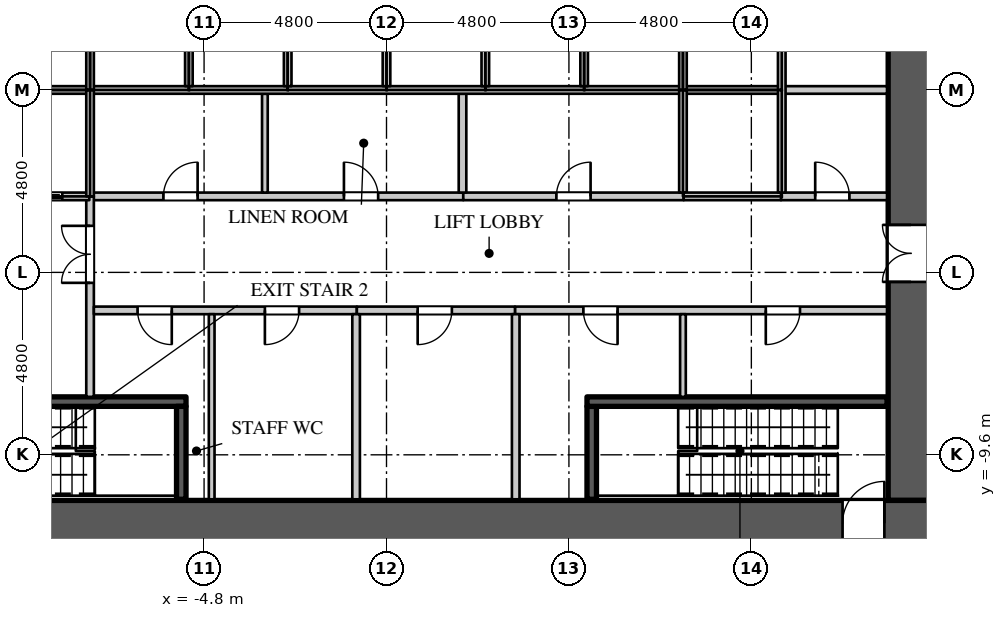
"""IFC4 building model, lengths in metres.
Left out: names, types, materials, properties, quantities, classifications, styles, units other than length and angle.
Written with IfcOpenShell. Run it as: python <this file> out.ifc"""

import sys

from ifc_helpers import new_model, si_unit, direction, frame, frame_2d, origin, place, context, subcontext, project, spatial, rectangle, extrude, element, fill, save


model = new_model("IFC4")
c1 = context("Model", 3, precision=1e-05, world=origin(), true_north=direction((0.0, 1.0)))
c2 = subcontext(c1, "Body", "Model", "MODEL_VIEW")
j1 = project(units=[si_unit("LENGTHUNIT", "METRE"), si_unit("PLANEANGLEUNIT", "RADIAN")], contexts=[c1])
p1 = place(None, origin())
s1 = spatial("IfcSite", under=j1, at=p1, CompositionType="ELEMENT")
p2 = place(p1, origin())
s2 = spatial("IfcBuilding", under=s1, at=p2, CompositionType="ELEMENT")
p3 = place(p2, frame((0.0, 0.0, 16.0)))
s3 = spatial("IfcBuildingStorey", under=s2, at=p3, CompositionType="ELEMENT", Elevation=16.0)
p4 = place(p3, frame((-14.4, -11.4, 0.0), z_axis=(0.0, 0.0, 1.0), x_axis=(1.0, 0.0, 0.0)))
e1 = element("IfcWall", 1, at=p4, inside=s3, PredefinedType="SHEAR", context=c2, shape_type="SweptSolid", body=[
    extrude(rectangle(XDim=28.8, YDim=1.2, at=frame_2d((14.4, 0.0))), origin(), (0.0, 0.0, 1.0), 5.0),
])
p5 = place(p4, frame((1.3, 0.0, 0.0)))
e2 = element("IfcOpeningElement", 2, at=p5, cuts=e1, PredefinedType="OPENING", context=c2, shape_type="SweptSolid", body=[
    extrude(rectangle(XDim=1.1, YDim=2.2, at=frame_2d((0.55, 1.1))), frame((0.0, 0.61, 0.0), z_axis=(0.0, -1.0, 0.0), x_axis=(1.0, 0.0, 0.0)), (0.0, 0.0, 1.0), 1.22),
])
p6 = place(p4, frame((26.4, 0.0, 0.0)))
e3 = element("IfcOpeningElement", 3, at=p6, cuts=e1, PredefinedType="OPENING", context=c2, shape_type="SweptSolid", body=[
    extrude(rectangle(XDim=1.1, YDim=2.2, at=frame_2d((0.55, 1.1))), frame((0.0, 0.61, 0.0), z_axis=(0.0, -1.0, 0.0), x_axis=(1.0, 0.0, 0.0)), (0.0, 0.0, 1.0), 1.22),
])
p7 = place(p3, frame((13.8, -10.8, 0.0), z_axis=(0.0, 0.0, 1.0), x_axis=(0.0, 1.0, 0.0)))
e4 = element("IfcWall", 4, at=p7, inside=s3, PredefinedType="SHEAR", context=c2, shape_type="SweptSolid", body=[
    extrude(rectangle(XDim=21.6, YDim=1.2, at=frame_2d((10.8, 0.0))), origin(), (0.0, 0.0, 1.0), 5.0),
])
p8 = place(p7, frame((14.35, 0.0, 0.0)))
e5 = element("IfcOpeningElement", 5, at=p8, cuts=e4, PredefinedType="OPENING", context=c2, shape_type="SweptSolid", body=[
    extrude(rectangle(XDim=1.5, YDim=2.4, at=frame_2d((0.75, 1.2))), frame((0.0, 0.61, 0.0), z_axis=(0.0, -1.0, 0.0), x_axis=(1.0, 0.0, 0.0)), (0.0, 0.0, 1.0), 1.22),
])
p9 = place(p7, frame((5.75, 0.0, 0.0)))
e6 = element("IfcOpeningElement", 6, at=p9, cuts=e4, PredefinedType="OPENING", context=c2, shape_type="SweptSolid", body=[
    extrude(rectangle(XDim=1.5, YDim=2.4, at=frame_2d((0.75, 1.2))), frame((0.0, 0.61, 0.0), z_axis=(0.0, -1.0, 0.0), x_axis=(1.0, 0.0, 0.0)), (0.0, 0.0, 1.0), 1.22),
])
p10 = place(p3, frame((-7.82, -2.8, 0.0), z_axis=(0.0, 0.0, 1.0), x_axis=(1.0, 0.0, 0.0)))
e7 = element("IfcWall", 7, at=p10, inside=s3, PredefinedType="PARTITIONING", context=c2, shape_type="SweptSolid", body=[
    extrude(rectangle(XDim=9.84, YDim=0.2, at=frame_2d((4.92, 0.0))), origin(), (0.0, 0.0, 1.0), 4.4),
])
p11 = place(p10, frame((1.95, 0.0, 0.0)))
e8 = element("IfcOpeningElement", 8, at=p11, cuts=e7, PredefinedType="OPENING", context=c2, shape_type="SweptSolid", body=[
    extrude(rectangle(XDim=0.9, YDim=2.2, at=frame_2d((0.45, 1.1))), frame((0.0, 0.11, 0.0), z_axis=(0.0, -1.0, 0.0), x_axis=(1.0, 0.0, 0.0)), (0.0, 0.0, 1.0), 0.22),
])
p12 = place(p10, frame((6.7, 0.0, 0.0)))
e9 = element("IfcOpeningElement", 9, at=p12, cuts=e7, PredefinedType="OPENING", context=c2, shape_type="SweptSolid", body=[
    extrude(rectangle(XDim=0.9, YDim=2.2, at=frame_2d((0.45, 1.1))), frame((0.0, 0.11, 0.0), z_axis=(0.0, -1.0, 0.0), x_axis=(1.0, 0.0, 0.0)), (0.0, 0.0, 1.0), 0.22),
])
p13 = place(p3, frame((-7.8, -8.075, 0.0), z_axis=(0.0, 0.0, 1.0), x_axis=(0.0, 1.0, 0.0)))
e10 = element("IfcWall", 10, at=p13, inside=s3, PredefinedType="PARTITIONING", context=c2, shape_type="SweptSolid", body=[
    extrude(rectangle(XDim=5.275, YDim=0.2, at=frame_2d((2.637, 0.0))), origin(), (0.0, 0.0, 1.0), 4.4),
])
p14 = place(p13, frame((3.0, 0.0, 0.0)))
e11 = element("IfcOpeningElement", 11, at=p14, cuts=e10, PredefinedType="OPENING", context=c2, shape_type="SweptSolid", body=[
    extrude(rectangle(XDim=1.5, YDim=2.4, at=frame_2d((0.75, 1.2))), frame((0.0, 0.11, 0.0), z_axis=(0.0, -1.0, 0.0), x_axis=(1.0, 0.0, 0.0)), (0.0, 0.0, 1.0), 0.22),
])
p15 = place(p3, frame((-7.7, -5.8, 0.0), z_axis=(0.0, 0.0, 1.0), x_axis=(1.0, 0.0, 0.0)))
e12 = element("IfcWall", 12, at=p15, inside=s3, PredefinedType="PARTITIONING", context=c2, shape_type="SweptSolid", body=[
    extrude(rectangle(XDim=6.92, YDim=0.2, at=frame_2d((3.46, 0.0))), origin(), (0.0, 0.0, 1.0), 4.4),
])
p16 = place(p15, frame((1.15, 0.0, 0.0)))
e13 = element("IfcOpeningElement", 13, at=p16, cuts=e12, PredefinedType="OPENING", context=c2, shape_type="SweptSolid", body=[
    extrude(rectangle(XDim=0.9, YDim=2.2, at=frame_2d((0.45, 1.1))), frame((0.0, 0.11, 0.0), z_axis=(0.0, -1.0, 0.0), x_axis=(1.0, 0.0, 0.0)), (0.0, 0.0, 1.0), 0.22),
])
p17 = place(p15, frame((4.5, 0.0, 0.0)))
e14 = element("IfcOpeningElement", 14, at=p17, cuts=e12, PredefinedType="OPENING", context=c2, shape_type="SweptSolid", body=[
    extrude(rectangle(XDim=0.9, YDim=2.2, at=frame_2d((0.45, 1.1))), frame((0.0, 0.11, 0.0), z_axis=(0.0, -1.0, 0.0), x_axis=(1.0, 0.0, 0.0)), (0.0, 0.0, 1.0), 0.22),
])
p18 = place(p3, frame((3.38, -5.8, 0.0), z_axis=(0.0, 0.0, 1.0), x_axis=(1.0, 0.0, 0.0)))
e15 = element("IfcWall", 15, at=p18, inside=s3, PredefinedType="PARTITIONING", context=c2, shape_type="SweptSolid", body=[
    extrude(rectangle(XDim=9.79, YDim=0.2, at=frame_2d((4.895, 0.0))), origin(), (0.0, 0.0, 1.0), 4.4),
])
p19 = place(p18, frame((1.8, 0.0, 0.0)))
e16 = element("IfcOpeningElement", 16, at=p19, cuts=e15, PredefinedType="OPENING", context=c2, shape_type="SweptSolid", body=[
    extrude(rectangle(XDim=0.9, YDim=2.2, at=frame_2d((0.45, 1.1))), frame((0.0, 0.11, 0.0), z_axis=(0.0, -1.0, 0.0), x_axis=(1.0, 0.0, 0.0)), (0.0, 0.0, 1.0), 0.22),
])
p20 = place(p18, frame((6.6, 0.0, 0.0)))
e17 = element("IfcOpeningElement", 17, at=p20, cuts=e15, PredefinedType="OPENING", context=c2, shape_type="SweptSolid", body=[
    extrude(rectangle(XDim=0.9, YDim=2.2, at=frame_2d((0.45, 1.1))), frame((0.0, 0.11, 0.0), z_axis=(0.0, -1.0, 0.0), x_axis=(1.0, 0.0, 0.0)), (0.0, 0.0, 1.0), 0.22),
])
p21 = place(p3, frame((-4.6, -10.77, 0.0), z_axis=(0.0, 0.0, 1.0), x_axis=(0.0, 1.0, 0.0)))
e18 = element("IfcWall", 18, at=p21, inside=s3, PredefinedType="PARTITIONING", context=c2, shape_type="SweptSolid", body=[
    extrude(rectangle(XDim=4.87, YDim=0.15, at=frame_2d((2.435, 0.0))), origin(), (0.0, 0.0, 1.0), 4.4),
])
p22 = place(p3, frame((-3.2, -2.7, 0.0), z_axis=(0.0, 0.0, 1.0), x_axis=(0.0, 1.0, 0.0)))
e19 = element("IfcWall", 19, at=p22, inside=s3, PredefinedType="PARTITIONING", context=c2, shape_type="SweptSolid", body=[
    extrude(rectangle(XDim=2.6, YDim=0.15, at=frame_2d((1.3, 0.0))), origin(), (0.0, 0.0, 1.0), 4.4),
])
p23 = place(p3, frame((7.8, -8.075, 0.0), z_axis=(0.0, 0.0, 1.0), x_axis=(0.0, 1.0, 0.0)))
e20 = element("IfcWall", 20, at=p23, inside=s3, PredefinedType="PARTITIONING", context=c2, shape_type="SweptSolid", body=[
    extrude(rectangle(XDim=2.175, YDim=0.15, at=frame_2d((1.087, 0.0))), origin(), (0.0, 0.0, 1.0), 4.4),
])
p24 = place(p3, frame((-0.78, -5.8, 0.0), z_axis=(0.0, 0.0, 1.0), x_axis=(1.0, 0.0, 0.0)))
e21 = element("IfcWall", 21, at=p24, inside=s3, PredefinedType="PARTITIONING", context=c2, shape_type="SweptSolid", body=[
    extrude(rectangle(XDim=4.16, YDim=0.2, at=frame_2d((2.08, 0.0))), origin(), (0.0, 0.0, 1.0), 4.4),
])
p25 = place(p24, frame((1.6, 0.0, 0.0)))
e22 = element("IfcOpeningElement", 22, at=p25, cuts=e21, PredefinedType="OPENING", context=c2, shape_type="SweptSolid", body=[
    extrude(rectangle(XDim=0.9, YDim=2.2, at=frame_2d((0.45, 1.1))), frame((0.0, 0.11, 0.0), z_axis=(0.0, -1.0, 0.0), x_axis=(1.0, 0.0, 0.0)), (0.0, 0.0, 1.0), 0.22),
])
p26 = place(p3, frame((-0.8, -10.77, 0.0), z_axis=(0.0, 0.0, 1.0), x_axis=(0.0, 1.0, 0.0)))
e23 = element("IfcWall", 23, at=p26, inside=s3, PredefinedType="PARTITIONING", context=c2, shape_type="SweptSolid", body=[
    extrude(rectangle(XDim=4.87, YDim=0.2, at=frame_2d((2.435, 0.0))), origin(), (0.0, 0.0, 1.0), 4.4),
])
p27 = place(p3, frame((2.02, -2.8, 0.0), z_axis=(0.0, 0.0, 1.0), x_axis=(1.0, 0.0, 0.0)))
e24 = element("IfcWall", 24, at=p27, inside=s3, PredefinedType="PARTITIONING", context=c2, shape_type="SweptSolid", body=[
    extrude(rectangle(XDim=5.8, YDim=0.2, at=frame_2d((2.9, 0.0))), origin(), (0.0, 0.0, 1.0), 4.4),
])
p28 = place(p27, frame((2.45, 0.0, 0.0)))
e25 = element("IfcOpeningElement", 25, at=p28, cuts=e24, PredefinedType="OPENING", context=c2, shape_type="SweptSolid", body=[
    extrude(rectangle(XDim=0.9, YDim=2.2, at=frame_2d((0.45, 1.1))), frame((0.0, 0.11, 0.0), z_axis=(0.0, -1.0, 0.0), x_axis=(1.0, 0.0, 0.0)), (0.0, 0.0, 1.0), 0.22),
])
p29 = place(p3, frame((2.0, -2.7, 0.0), z_axis=(0.0, 0.0, 1.0), x_axis=(0.0, 1.0, 0.0)))
e26 = element("IfcWall", 26, at=p29, inside=s3, PredefinedType="PARTITIONING", context=c2, shape_type="SweptSolid", body=[
    extrude(rectangle(XDim=2.6, YDim=0.2, at=frame_2d((1.3, 0.0))), origin(), (0.0, 0.0, 1.0), 4.4),
])
p30 = place(p3, frame((3.4, -10.77, 0.0), z_axis=(0.0, 0.0, 1.0), x_axis=(0.0, 1.0, 0.0)))
e27 = element("IfcWall", 27, at=p30, inside=s3, PredefinedType="PARTITIONING", context=c2, shape_type="SweptSolid", body=[
    extrude(rectangle(XDim=4.87, YDim=0.2, at=frame_2d((2.435, 0.0))), origin(), (0.0, 0.0, 1.0), 4.4),
])
p31 = place(p3, frame((10.38, -2.8, 0.0), z_axis=(0.0, 0.0, 1.0), x_axis=(1.0, 0.0, 0.0)))
e28 = element("IfcWall", 28, at=p31, inside=s3, PredefinedType="PARTITIONING", context=c2, shape_type="SweptSolid", body=[
    extrude(rectangle(XDim=2.79, YDim=0.2, at=frame_2d((1.395, 0.0))), origin(), (0.0, 0.0, 1.0), 4.4),
])
p32 = place(p31, frame((0.9, 0.0, 0.0)))
e29 = element("IfcOpeningElement", 29, at=p32, cuts=e28, PredefinedType="OPENING", context=c2, shape_type="SweptSolid", body=[
    extrude(rectangle(XDim=0.9, YDim=2.2, at=frame_2d((0.45, 1.1))), frame((0.0, 0.11, 0.0), z_axis=(0.0, -1.0, 0.0), x_axis=(1.0, 0.0, 0.0)), (0.0, 0.0, 1.0), 0.22),
])
p33 = place(p3, frame((10.4, 0.0, 0.0), z_axis=(0.0, 0.0, 1.0), x_axis=(1.0, 0.0, 0.0)))
e30 = element("IfcWall", 30, at=p33, inside=s3, PredefinedType="PARTITIONING", context=c2, shape_type="SweptSolid", body=[
    extrude(rectangle(XDim=2.77, YDim=0.2, at=frame_2d((1.385, 0.0))), origin(), (0.0, 0.0, 1.0), 4.4),
])
p34 = place(p3, frame((-13.17, 0.0, 0.0), z_axis=(0.0, 0.0, 1.0), x_axis=(1.0, 0.0, 0.0)))
e31 = element("IfcWall", 31, at=p34, inside=s3, PredefinedType="PARTITIONING", context=c2, shape_type="SweptSolid", body=[
    extrude(rectangle(XDim=23.57, YDim=0.2, at=frame_2d((11.785, 0.0))), origin(), (0.0, 0.0, 1.0), 4.4),
])
p35 = place(p3, frame((-10.38, -2.8, 0.0), z_axis=(0.0, 0.0, 1.0), x_axis=(1.0, 0.0, 0.0)))
e32 = element("IfcWall", 32, at=p35, inside=s3, PredefinedType="PARTITIONING", context=c2, shape_type="SweptSolid", body=[
    extrude(rectangle(XDim=2.56, YDim=0.2, at=frame_2d((1.28, 0.0))), origin(), (0.0, 0.0, 1.0), 4.4),
])
p36 = place(p35, frame((0.75, 0.0, 0.0)))
e33 = element("IfcOpeningElement", 33, at=p36, cuts=e32, PredefinedType="OPENING", context=c2, shape_type="SweptSolid", body=[
    extrude(rectangle(XDim=1.1, YDim=2.2, at=frame_2d((0.55, 1.1))), frame((0.0, 0.11, 0.0), z_axis=(0.0, -1.0, 0.0), x_axis=(1.0, 0.0, 0.0)), (0.0, 0.0, 1.0), 0.22),
])
for number, where, z_axis, x_axis in (
    (34, (-7.8, -2.8, 0.0), (0.0, 0.0, 1.0), (0.0, 1.0, 0.0)),
    (35, (-7.8, 0.0, 0.0), (0.0, 0.0, 1.0), (0.0, 1.0, 0.0)),
):
    element("IfcWall", number, at=place(p3, frame(where, z_axis=z_axis, x_axis=x_axis)), inside=s3, PredefinedType="PARTITIONING", context=c2, shape_type="SweptSolid", body=[
        extrude(rectangle(XDim=2.8, YDim=0.2, at=frame_2d((1.4, 0.0))), origin(), (0.0, 0.0, 1.0), 4.4),
    ])
for number, where, z_axis, x_axis in (
    (36, (-5.2, 0.1, 0.0), (0.0, 0.0, 1.0), (0.0, 1.0, 0.0)),
    (37, (-2.6, 0.1, 0.0), (0.0, 0.0, 1.0), (0.0, 1.0, 0.0)),
    (38, (0.0, 0.1, 0.0), (0.0, 0.0, 1.0), (0.0, 1.0, 0.0)),
    (39, (2.6, 0.1, 0.0), (0.0, 0.0, 1.0), (0.0, 1.0, 0.0)),
    (40, (5.2, 0.1, 0.0), (0.0, 0.0, 1.0), (0.0, 1.0, 0.0)),
):
    element("IfcWall", number, at=place(p3, frame(where, z_axis=z_axis, x_axis=x_axis)), inside=s3, PredefinedType="PARTITIONING", context=c2, shape_type="SweptSolid", body=[
        extrude(rectangle(XDim=2.6, YDim=0.2, at=frame_2d((1.3, 0.0))), origin(), (0.0, 0.0, 1.0), 4.4),
    ])
p37 = place(p3, frame((7.8, -2.7, 0.0), z_axis=(0.0, 0.0, 1.0), x_axis=(0.0, 1.0, 0.0)))
e41 = element("IfcWall", 41, at=p37, inside=s3, PredefinedType="PARTITIONING", context=c2, shape_type="SweptSolid", body=[
    extrude(rectangle(XDim=2.7, YDim=0.2, at=frame_2d((1.35, 0.0))), origin(), (0.0, 0.0, 1.0), 4.4),
])
p38 = place(p3, frame((7.82, -2.8, 0.0), z_axis=(0.0, 0.0, 1.0), x_axis=(1.0, 0.0, 0.0)))
e42 = element("IfcWall", 42, at=p38, inside=s3, PredefinedType="PARTITIONING", context=c2, shape_type="SweptSolid", body=[
    extrude(rectangle(XDim=2.56, YDim=0.2, at=frame_2d((1.28, 0.0))), origin(), (0.0, 0.0, 1.0), 4.4),
])
p39 = place(p3, frame((7.8, 0.0, 0.0), z_axis=(0.0, 0.0, 1.0), x_axis=(0.0, 1.0, 0.0)))
e43 = element("IfcWall", 43, at=p39, inside=s3, PredefinedType="PARTITIONING", context=c2, shape_type="SweptSolid", body=[
    extrude(rectangle(XDim=2.7, YDim=0.2, at=frame_2d((1.35, 0.0))), origin(), (0.0, 0.0, 1.0), 4.4),
])
p40 = place(p3, frame((10.4, -2.7, 0.0), z_axis=(0.0, 0.0, 1.0), x_axis=(0.0, 1.0, 0.0)))
e44 = element("IfcWall", 44, at=p40, inside=s3, PredefinedType="PARTITIONING", context=c2, shape_type="SweptSolid", body=[
    extrude(rectangle(XDim=5.4, YDim=0.2, at=frame_2d((2.7, 0.0))), origin(), (0.0, 0.0, 1.0), 4.4),
])
p41 = place(p3, frame((-13.17, -8.2, 0.0), z_axis=(0.0, 0.0, 1.0), x_axis=(1.0, 0.0, 0.0)))
e45 = element("IfcWall", 45, at=p41, inside=s3, PredefinedType="SHEAR", context=c2, shape_type="SweptSolid", body=[
    extrude(rectangle(XDim=7.895, YDim=0.25, at=frame_2d((3.948, 0.0))), origin(), (0.0, 0.0, 1.0), 4.65),
])
p42 = place(p41, frame((0.15, 0.0, 0.0)))
e46 = element("IfcOpeningElement", 46, at=p42, cuts=e45, PredefinedType="OPENING", context=c2, shape_type="SweptSolid", body=[
    extrude(rectangle(XDim=1.1, YDim=2.2, at=frame_2d((0.55, 1.1))), frame((0.0, 0.135, 0.0), z_axis=(0.0, -1.0, 0.0), x_axis=(1.0, 0.0, 0.0)), (0.0, 0.0, 1.0), 0.27),
])
for number, where, z_axis, x_axis in (
    (47, (-5.4, -10.77, 0.0), (0.0, 0.0, 1.0), (0.0, 1.0, 0.0)),
    (48, (5.4, -10.77, 0.0), (0.0, 0.0, 1.0), (0.0, 1.0, 0.0)),
):
    element("IfcWall", number, at=place(p3, frame(where, z_axis=z_axis, x_axis=x_axis)), inside=s3, PredefinedType="SHEAR", context=c2, shape_type="SweptSolid", body=[
        extrude(rectangle(XDim=2.445, YDim=0.25, at=frame_2d((1.223, 0.0))), origin(), (0.0, 0.0, 1.0), 4.65),
    ])
p43 = place(p3, frame((5.275, -8.2, 0.0), z_axis=(0.0, 0.0, 1.0), x_axis=(1.0, 0.0, 0.0)))
e49 = element("IfcWall", 49, at=p43, inside=s3, PredefinedType="SHEAR", context=c2, shape_type="SweptSolid", body=[
    extrude(rectangle(XDim=7.895, YDim=0.25, at=frame_2d((3.948, 0.0))), origin(), (0.0, 0.0, 1.0), 4.65),
])
p44 = place(p32, origin())
e50 = element("IfcDoor", 50, at=p44, inside=s3, OperationType="SINGLE_SWING_LEFT", PredefinedType="DOOR", context=c2, shape_type="SweptSolid", body=[
    extrude(rectangle(XDim=0.9, YDim=2.2, at=frame_2d((0.45, 1.1))), frame((0.0, 0.025, 0.0), z_axis=(0.0, -1.0, 0.0), x_axis=(1.0, 0.0, 0.0)), (0.0, 0.0, 1.0), 0.05),
])
fill(e29, e50)
p45 = place(p16, origin())
e51 = element("IfcDoor", 51, at=p45, inside=s3, OperationType="SINGLE_SWING_LEFT", PredefinedType="DOOR", context=c2, shape_type="SweptSolid", body=[
    extrude(rectangle(XDim=0.9, YDim=2.2, at=frame_2d((0.45, 1.1))), frame((0.0, 0.025, 0.0), z_axis=(0.0, -1.0, 0.0), x_axis=(1.0, 0.0, 0.0)), (0.0, 0.0, 1.0), 0.05),
])
fill(e13, e51)
p46 = place(p17, origin())
e52 = element("IfcDoor", 52, at=p46, inside=s3, OperationType="SINGLE_SWING_RIGHT", PredefinedType="DOOR", context=c2, shape_type="SweptSolid", body=[
    extrude(rectangle(XDim=0.9, YDim=2.2, at=frame_2d((0.45, 1.1))), frame((0.0, 0.025, 0.0), z_axis=(0.0, -1.0, 0.0), x_axis=(1.0, 0.0, 0.0)), (0.0, 0.0, 1.0), 0.05),
])
fill(e14, e52)
p47 = place(p25, origin())
e53 = element("IfcDoor", 53, at=p47, inside=s3, OperationType="SINGLE_SWING_RIGHT", PredefinedType="DOOR", context=c2, shape_type="SweptSolid", body=[
    extrude(rectangle(XDim=0.9, YDim=2.2, at=frame_2d((0.45, 1.1))), frame((0.0, 0.025, 0.0), z_axis=(0.0, -1.0, 0.0), x_axis=(1.0, 0.0, 0.0)), (0.0, 0.0, 1.0), 0.05),
])
fill(e22, e53)
p48 = place(p19, origin())
e54 = element("IfcDoor", 54, at=p48, inside=s3, OperationType="SINGLE_SWING_LEFT", PredefinedType="DOOR", context=c2, shape_type="SweptSolid", body=[
    extrude(rectangle(XDim=0.9, YDim=2.2, at=frame_2d((0.45, 1.1))), frame((0.0, 0.025, 0.0), z_axis=(0.0, -1.0, 0.0), x_axis=(1.0, 0.0, 0.0)), (0.0, 0.0, 1.0), 0.05),
])
fill(e16, e54)
p49 = place(p20, origin())
e55 = element("IfcDoor", 55, at=p49, inside=s3, OperationType="SINGLE_SWING_RIGHT", PredefinedType="DOOR", context=c2, shape_type="SweptSolid", body=[
    extrude(rectangle(XDim=0.9, YDim=2.2, at=frame_2d((0.45, 1.1))), frame((0.0, 0.025, 0.0), z_axis=(0.0, -1.0, 0.0), x_axis=(1.0, 0.0, 0.0)), (0.0, 0.0, 1.0), 0.05),
])
fill(e17, e55)
p50 = place(p11, origin())
e56 = element("IfcDoor", 56, at=p50, inside=s3, OperationType="SINGLE_SWING_RIGHT", PredefinedType="DOOR", context=c2, shape_type="SweptSolid", body=[
    extrude(rectangle(XDim=0.9, YDim=2.2, at=frame_2d((0.45, 1.1))), frame((0.0, 0.025, 0.0), z_axis=(0.0, -1.0, 0.0), x_axis=(1.0, 0.0, 0.0)), (0.0, 0.0, 1.0), 0.05),
])
fill(e8, e56)
p51 = place(p12, origin())
e57 = element("IfcDoor", 57, at=p51, inside=s3, OperationType="SINGLE_SWING_LEFT", PredefinedType="DOOR", context=c2, shape_type="SweptSolid", body=[
    extrude(rectangle(XDim=0.9, YDim=2.2, at=frame_2d((0.45, 1.1))), frame((0.0, 0.025, 0.0), z_axis=(0.0, -1.0, 0.0), x_axis=(1.0, 0.0, 0.0)), (0.0, 0.0, 1.0), 0.05),
])
fill(e9, e57)
p52 = place(p28, origin())
e58 = element("IfcDoor", 58, at=p52, inside=s3, OperationType="SINGLE_SWING_RIGHT", PredefinedType="DOOR", context=c2, shape_type="SweptSolid", body=[
    extrude(rectangle(XDim=0.9, YDim=2.2, at=frame_2d((0.45, 1.1))), frame((0.0, 0.025, 0.0), z_axis=(0.0, -1.0, 0.0), x_axis=(1.0, 0.0, 0.0)), (0.0, 0.0, 1.0), 0.05),
])
fill(e25, e58)
p53 = place(p36, origin())
e59 = element("IfcDoor", 59, at=p53, inside=s3, OperationType="DOUBLE_DOOR_SLIDING", PredefinedType="DOOR", context=c2, shape_type="SweptSolid", body=[
    extrude(rectangle(XDim=1.1, YDim=2.2, at=frame_2d((0.55, 1.1))), frame((0.0, 0.025, 0.0), z_axis=(0.0, -1.0, 0.0), x_axis=(1.0, 0.0, 0.0)), (0.0, 0.0, 1.0), 0.05),
])
fill(e33, e59)
p54 = place(p14, origin())
e60 = element("IfcDoor", 60, at=p54, inside=s3, OperationType="DOUBLE_DOOR_SINGLE_SWING", PredefinedType="DOOR", context=c2, shape_type="SweptSolid", body=[
    extrude(rectangle(XDim=1.5, YDim=2.4, at=frame_2d((0.75, 1.2))), frame((0.0, 0.025, 0.0), z_axis=(0.0, -1.0, 0.0), x_axis=(1.0, 0.0, 0.0)), (0.0, 0.0, 1.0), 0.05),
])
fill(e11, e60)
p55 = place(p9, origin())
e61 = element("IfcDoor", 61, at=p55, inside=s3, OperationType="DOUBLE_DOOR_SINGLE_SWING", PredefinedType="DOOR", context=c2, shape_type="SweptSolid", body=[
    extrude(rectangle(XDim=1.5, YDim=2.4, at=frame_2d((0.75, 1.2))), frame((0.0, 0.025, 0.0), z_axis=(0.0, -1.0, 0.0), x_axis=(1.0, 0.0, 0.0)), (0.0, 0.0, 1.0), 0.05),
])
fill(e6, e61)
p56 = place(p6, origin())
e62 = element("IfcDoor", 62, at=p56, inside=s3, OperationType="SINGLE_SWING_RIGHT", PredefinedType="DOOR", context=c2, shape_type="SweptSolid", body=[
    extrude(rectangle(XDim=1.1, YDim=2.2, at=frame_2d((0.55, 1.1))), frame((0.0, 0.025, 0.0), z_axis=(0.0, -1.0, 0.0), x_axis=(1.0, 0.0, 0.0)), (0.0, 0.0, 1.0), 0.05),
])
fill(e3, e62)
save(model, sys.argv[1])
